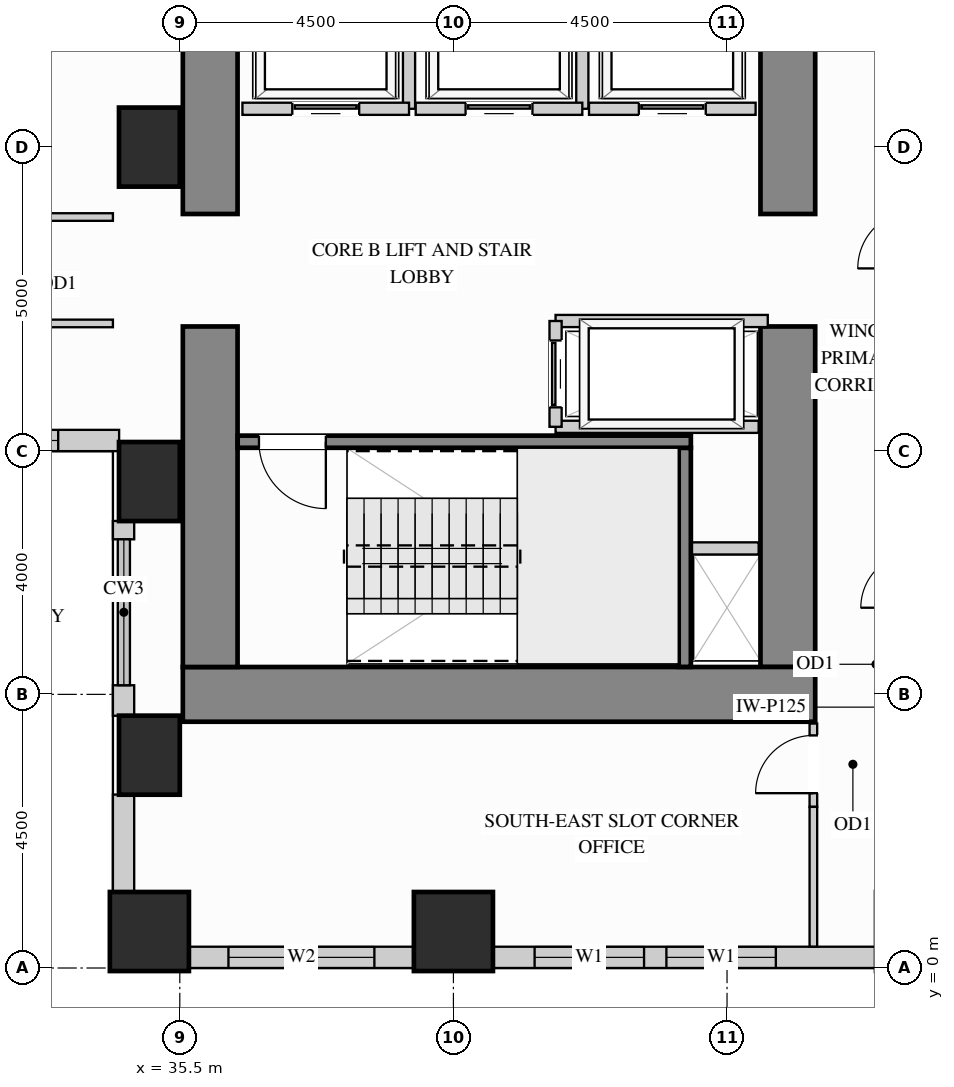
"""IFC4 building model, lengths in metres.
Left out: names, types, materials, properties, quantities, classifications, styles, units other than length and angle.
Written with IfcOpenShell. Run it as: python <this file> out.ifc"""

import sys

from ifc_helpers import new_model, si_unit, direction, frame, frame_2d, origin, origin_2d, place, context, subcontext, project, spatial, rectangle, extrude, source, transform, mapped, element, fill, save


model = new_model("IFC4")
c1 = context("Model", 3, precision=1e-05, world=origin(), true_north=direction((0.0, 1.0)))
c2 = subcontext(c1, "Body", "Model", "MODEL_VIEW")
j1 = project(units=[si_unit("LENGTHUNIT", "METRE"), si_unit("PLANEANGLEUNIT", "RADIAN")], contexts=[c1])
p1 = place(None, origin())
s1 = spatial("IfcSite", under=j1, at=p1, CompositionType="ELEMENT")
p2 = place(p1, origin())
s2 = spatial("IfcBuilding", under=s1, at=p2, CompositionType="ELEMENT")
p3 = place(p2, frame((0.0, 0.0, 58.5)))
s3 = spatial("IfcBuildingStorey", under=s2, at=p3, CompositionType="ELEMENT", Elevation=58.5)
m1 = source(origin(), c2, "Body", "SweptSolid", [
    extrude(rectangle(XDim=1.0, YDim=1.3, at=origin_2d()), origin(), (0.0, 0.0, 1.0), 3.38),
])
for number, where, z_axis, x_axis in (
    (1, (35.0, 13.5, 0.0), (0.0, 0.0, 1.0), (1.0, 0.0, 0.0)),
    (2, (35.0, 3.5, 0.0), (0.0, 0.0, 1.0), (1.0, 0.0, 0.0)),
    (3, (35.0, 8.0, 0.0), (0.0, 0.0, 1.0), (1.0, 0.0, 0.0)),
):
    element("IfcColumn", number, at=place(p3, frame(where, z_axis=z_axis, x_axis=x_axis)), inside=s3, PredefinedType="COLUMN", context=c2, shape_type="MappedRepresentation", body=[
        mapped(m1, transform((0.0, 0.0, 0.0), x_axis=(1.0, 0.0, 0.0), y_axis=(0.0, 1.0, 0.0), z_axis=(0.0, 0.0, 1.0))),
    ])
m2 = source(origin(), c2, "Body", "SweptSolid", [
    extrude(rectangle(XDim=1.3, YDim=1.3, at=origin_2d()), origin(), (0.0, 0.0, 1.0), 3.38),
])
for number, where, z_axis, x_axis in (
    (4, (35.0, 0.6, 0.0), (0.0, 0.0, 1.0), (1.0, 0.0, 0.0)),
    (5, (40.0, 0.6, 0.0), (0.0, 0.0, 1.0), (1.0, 0.0, 0.0)),
):
    element("IfcColumn", number, at=place(p3, frame(where, z_axis=z_axis, x_axis=x_axis)), inside=s3, PredefinedType="COLUMN", context=c2, shape_type="MappedRepresentation", body=[
        mapped(m2, transform((0.0, 0.0, 0.0), x_axis=(1.0, 0.0, 0.0), y_axis=(0.0, 1.0, 0.0), z_axis=(0.0, 0.0, 1.0))),
    ])
m3 = source(origin(), c2, "Body", "SweptSolid", [
    extrude(rectangle(XDim=5.6, YDim=0.9, at=frame_2d((2.8, 0.0))), origin(), (0.0, 0.0, 1.0), 3.38),
])
p4 = place(p3, frame((45.5, 4.95, 0.0), z_axis=(0.0, 0.0, 1.0), x_axis=(0.0, 1.0, 0.0)))
e6 = element("IfcWall", 6, at=p4, inside=s3, PredefinedType="SHEAR", context=c2, shape_type="MappedRepresentation", body=[
    mapped(m3, transform((0.0, 0.0, 0.0), x_axis=(1.0, 0.0, 0.0), y_axis=(0.0, 1.0, 0.0), z_axis=(0.0, 0.0, 1.0))),
])
m4 = source(origin(), c2, "Body", "SweptSolid", [
    extrude(rectangle(XDim=3.65, YDim=0.9, at=frame_2d((1.825, 0.0))), origin(), (0.0, 0.0, 1.0), 3.38),
])
p5 = place(p3, frame((45.5, 12.4, 0.0), z_axis=(0.0, 0.0, 1.0), x_axis=(0.0, 1.0, 0.0)))
e7 = element("IfcWall", 7, at=p5, inside=s3, PredefinedType="SHEAR", context=c2, shape_type="MappedRepresentation", body=[
    mapped(m4, transform((0.0, 0.0, 0.0), x_axis=(1.0, 0.0, 0.0), y_axis=(0.0, 1.0, 0.0), z_axis=(0.0, 0.0, 1.0))),
])
m5 = source(origin(), c2, "Body", "SweptSolid", [
    extrude(rectangle(XDim=10.4, YDim=0.9, at=frame_2d((5.2, 0.0))), origin(), (0.0, 0.0, 1.0), 3.38),
])
p6 = place(p3, frame((35.55, 4.5, 0.0), z_axis=(0.0, 0.0, 1.0), x_axis=(1.0, 0.0, 0.0)))
e8 = element("IfcWall", 8, at=p6, inside=s3, PredefinedType="SHEAR", context=c2, shape_type="MappedRepresentation", body=[
    mapped(m5, transform((0.0, 0.0, 0.0), x_axis=(1.0, 0.0, 0.0), y_axis=(0.0, 1.0, 0.0), z_axis=(0.0, 0.0, 1.0))),
])
p7 = place(p3, frame((36.0, 4.95, 0.0), z_axis=(0.0, 0.0, 1.0), x_axis=(0.0, 1.0, 0.0)))
e9 = element("IfcWall", 9, at=p7, inside=s3, PredefinedType="SHEAR", context=c2, shape_type="MappedRepresentation", body=[
    mapped(m3, transform((0.0, 0.0, 0.0), x_axis=(1.0, 0.0, 0.0), y_axis=(0.0, 1.0, 0.0), z_axis=(0.0, 0.0, 1.0))),
])
p8 = place(p3, frame((36.0, 12.4, 0.0), z_axis=(0.0, 0.0, 1.0), x_axis=(0.0, 1.0, 0.0)))
e10 = element("IfcWall", 10, at=p8, inside=s3, PredefinedType="SHEAR", context=c2, shape_type="MappedRepresentation", body=[
    mapped(m4, transform((0.0, 0.0, 0.0), x_axis=(1.0, 0.0, 0.0), y_axis=(0.0, 1.0, 0.0), z_axis=(0.0, 0.0, 1.0))),
])
p9 = place(p3, frame((30.998, 8.675, 0.0), z_axis=(0.0, 0.0, 1.0), x_axis=(1.0, 0.0, 0.0)))
e11 = element("IfcWall", 11, at=p9, inside=s3, PredefinedType="SOLIDWALL", context=c2, shape_type="SweptSolid", body=[
    extrude(rectangle(XDim=3.504, YDim=0.35, at=frame_2d((1.752, 0.0))), origin(), (0.0, 0.0, 1.0), 3.365),
])
p10 = place(p9, frame((1.002, 0.0, 0.78)))
e12 = element("IfcOpeningElement", 12, at=p10, cuts=e11, PredefinedType="OPENING", context=c2, shape_type="SweptSolid", body=[
    extrude(rectangle(XDim=1.5, YDim=2.0, at=frame_2d((0.75, 1.0))), frame((0.0, 0.185, 0.0), z_axis=(0.0, -1.0, 0.0), x_axis=(1.0, 0.0, 0.0)), (0.0, 0.0, 1.0), 0.37),
])
m6 = source(origin(), c2, "Body", "SweptSolid", [
    extrude(rectangle(XDim=0.302, YDim=0.35, at=frame_2d((0.151, 0.0))), origin(), (0.0, 0.0, 1.0), 2.51),
])
p11 = place(p3, frame((34.575, 7.352, 0.0), z_axis=(0.0, 0.0, 1.0), x_axis=(0.0, -1.0, 0.0)))
e13 = element("IfcWall", 13, at=p11, inside=s3, PredefinedType="SOLIDWALL", context=c2, shape_type="MappedRepresentation", body=[
    mapped(m6, transform((0.0, 0.0, 0.0), x_axis=(1.0, 0.0, 0.0), y_axis=(0.0, 1.0, 0.0), z_axis=(0.0, 0.0, 1.0))),
])
m7 = source(origin(), c2, "Body", "SweptSolid", [
    extrude(rectangle(XDim=0.502, YDim=0.35, at=frame_2d((0.251, 0.0))), origin(), (0.0, 0.0, 1.0), 2.51),
])
p12 = place(p3, frame((34.575, 4.65, 0.0), z_axis=(0.0, 0.0, 1.0), x_axis=(0.0, -1.0, 0.0)))
e14 = element("IfcWall", 14, at=p12, inside=s3, PredefinedType="SOLIDWALL", context=c2, shape_type="MappedRepresentation", body=[
    mapped(m7, transform((0.0, 0.0, 0.0), x_axis=(1.0, 0.0, 0.0), y_axis=(0.0, 1.0, 0.0), z_axis=(0.0, 0.0, 1.0))),
])
m8 = source(origin(), c2, "Body", "SweptSolid", [
    extrude(rectangle(XDim=1.604, YDim=0.35, at=frame_2d((0.802, 0.0))), origin(), (0.0, 0.0, 1.0), 2.51),
])
p13 = place(p3, frame((34.575, 2.852, 0.0), z_axis=(0.0, 0.0, 1.0), x_axis=(0.0, -1.0, 0.0)))
e15 = element("IfcWall", 15, at=p13, inside=s3, PredefinedType="SOLIDWALL", context=c2, shape_type="MappedRepresentation", body=[
    mapped(m8, transform((0.0, 0.0, 0.0), x_axis=(1.0, 0.0, 0.0), y_axis=(0.0, 1.0, 0.0), z_axis=(0.0, 0.0, 1.0))),
])
p14 = place(p3, frame((35.648, 0.175, 0.0), z_axis=(0.0, 0.0, 1.0), x_axis=(1.0, 0.0, 0.0)))
e16 = element("IfcWall", 16, at=p14, inside=s3, PredefinedType="SOLIDWALL", context=c2, shape_type="SweptSolid", body=[
    extrude(rectangle(XDim=3.704, YDim=0.35, at=frame_2d((1.852, 0.0))), origin(), (0.0, 0.0, 1.0), 2.428),
])
p15 = place(p14, frame((0.652, 0.0, 0.78)))
e17 = element("IfcOpeningElement", 17, at=p15, cuts=e16, PredefinedType="OPENING", context=c2, shape_type="SweptSolid", body=[
    extrude(rectangle(XDim=2.4, YDim=1.468, at=frame_2d((1.2, 0.734))), frame((0.0, 0.185, 0.0), z_axis=(0.0, -1.0, 0.0), x_axis=(1.0, 0.0, 0.0)), (0.0, 0.0, 1.0), 0.37),
])
p16 = place(p3, frame((40.648, 0.175, 0.0), z_axis=(0.0, 0.0, 1.0), x_axis=(1.0, 0.0, 0.0)))
e18 = element("IfcWall", 18, at=p16, inside=s3, PredefinedType="SOLIDWALL", context=c2, shape_type="SweptSolid", body=[
    extrude(rectangle(XDim=6.304, YDim=0.35, at=frame_2d((3.152, 0.0))), origin(), (0.0, 0.0, 1.0), 2.428),
])
p17 = place(p16, frame((0.687, 0.0, 0.78)))
e19 = element("IfcOpeningElement", 19, at=p17, cuts=e18, PredefinedType="OPENING", context=c2, shape_type="SweptSolid", body=[
    extrude(rectangle(XDim=1.8, YDim=1.468, at=frame_2d((0.9, 0.734))), frame((0.0, 0.185, 0.0), z_axis=(0.0, -1.0, 0.0), x_axis=(1.0, 0.0, 0.0)), (0.0, 0.0, 1.0), 0.37),
])
p18 = place(p16, frame((2.855, 0.0, 0.78)))
e20 = element("IfcOpeningElement", 20, at=p18, cuts=e18, PredefinedType="OPENING", context=c2, shape_type="SweptSolid", body=[
    extrude(rectangle(XDim=1.8, YDim=1.468, at=frame_2d((0.9, 0.734))), frame((0.0, 0.185, 0.0), z_axis=(0.0, -1.0, 0.0), x_axis=(1.0, 0.0, 0.0)), (0.0, 0.0, 1.0), 0.37),
])
p19 = place(p3, frame((45.92, 2.65, 0.0), z_axis=(0.0, 0.0, 1.0), x_axis=(0.0, 1.0, 0.0)))
e21 = element("IfcWall", 21, at=p19, inside=s3, PredefinedType="PARTITIONING", context=c2, shape_type="SweptSolid", body=[
    extrude(rectangle(XDim=1.37, YDim=0.125, at=frame_2d((0.685, 0.0))), origin(), (0.0, 0.0, 1.0), 3.365),
])
p20 = place(p19, frame((0.225, 0.0, 0.0)))
e22 = element("IfcOpeningElement", 22, at=p20, cuts=e21, PredefinedType="OPENING", context=c2, shape_type="SweptSolid", body=[
    extrude(rectangle(XDim=0.95, YDim=2.15, at=frame_2d((0.475, 1.075))), frame((0.0, 0.073, 0.0), z_axis=(0.0, -1.0, 0.0), x_axis=(1.0, 0.0, 0.0)), (0.0, 0.0, 1.0), 0.145),
])
m9 = source(origin(), c2, "Body", "SweptSolid", [
    extrude(rectangle(XDim=2.298, YDim=0.125, at=frame_2d((1.149, 0.0))), origin(), (0.0, 0.0, 1.0), 3.365),
])
p21 = place(p3, frame((45.92, 0.352, 0.0), z_axis=(0.0, 0.0, 1.0), x_axis=(0.0, 1.0, 0.0)))
e23 = element("IfcWall", 23, at=p21, inside=s3, PredefinedType="PARTITIONING", context=c2, shape_type="MappedRepresentation", body=[
    mapped(m9, transform((0.0, 0.0, 0.0), x_axis=(1.0, 0.0, 0.0), y_axis=(0.0, 1.0, 0.0), z_axis=(0.0, 0.0, 1.0))),
])
p22 = place(p3, frame((29.85, 12.35, 0.0), z_axis=(0.0, 0.0, 1.0), x_axis=(1.0, 0.0, 0.0)))
e24 = element("IfcWall", 24, at=p22, inside=s3, PredefinedType="PARTITIONING", context=c2, shape_type="SweptSolid", body=[
    extrude(rectangle(XDim=4.55, YDim=0.125, at=frame_2d((2.275, 0.0))), origin(), (0.0, 0.0, 1.0), 3.365),
])
p23 = place(p22, frame((1.8, 0.0, 0.0)))
e25 = element("IfcOpeningElement", 25, at=p23, cuts=e24, PredefinedType="OPENING", context=c2, shape_type="SweptSolid", body=[
    extrude(rectangle(XDim=0.95, YDim=2.15, at=frame_2d((0.475, 1.075))), frame((0.0, 0.073, 0.0), z_axis=(0.0, -1.0, 0.0), x_axis=(1.0, 0.0, 0.0)), (0.0, 0.0, 1.0), 0.145),
])
p24 = place(p3, frame((29.85, 10.6, 0.0), z_axis=(0.0, 0.0, 1.0), x_axis=(1.0, 0.0, 0.0)))
e26 = element("IfcWall", 26, at=p24, inside=s3, PredefinedType="PARTITIONING", context=c2, shape_type="SweptSolid", body=[
    extrude(rectangle(XDim=4.55, YDim=0.125, at=frame_2d((2.275, 0.0))), origin(), (0.0, 0.0, 1.0), 3.365),
])
p25 = place(p24, frame((1.8, 0.0, 0.0)))
e27 = element("IfcOpeningElement", 27, at=p25, cuts=e26, PredefinedType="OPENING", context=c2, shape_type="SweptSolid", body=[
    extrude(rectangle(XDim=0.95, YDim=2.15, at=frame_2d((0.475, 1.075))), frame((0.0, 0.073, 0.0), z_axis=(0.0, -1.0, 0.0), x_axis=(1.0, 0.0, 0.0)), (0.0, 0.0, 1.0), 0.145),
])
m10 = source(origin(), c2, "Body", "SweptSolid", [
    extrude(rectangle(XDim=1.17, YDim=0.2, at=frame_2d((0.585, 0.0))), origin(), (0.0, 0.0, 1.0), 3.365),
])
p26 = place(p3, frame((43.85, 6.9, 0.0), z_axis=(0.0, 0.0, 1.0), x_axis=(1.0, 0.0, 0.0)))
e28 = element("IfcWall", 28, at=p26, inside=s3, PredefinedType="PARTITIONING", context=c2, shape_type="MappedRepresentation", body=[
    mapped(m10, transform((0.0, 0.0, 0.0), x_axis=(1.0, 0.0, 0.0), y_axis=(0.0, 1.0, 0.0), z_axis=(0.0, 0.0, 1.0))),
])
m11 = source(origin(), c2, "Body", "SweptSolid", [
    extrude(rectangle(XDim=1.89, YDim=0.2, at=frame_2d((0.945, 0.0))), origin(), (0.0, 0.0, 1.0), 3.365),
])
p27 = place(p3, frame((39.27, 14.13, 0.0), z_axis=(0.0, 0.0, 1.0), x_axis=(0.0, 1.0, 0.0)))
e29 = element("IfcWall", 29, at=p27, inside=s3, PredefinedType="PARTITIONING", context=c2, shape_type="MappedRepresentation", body=[
    mapped(m11, transform((0.0, 0.0, 0.0), x_axis=(1.0, 0.0, 0.0), y_axis=(0.0, 1.0, 0.0), z_axis=(0.0, 0.0, 1.0))),
])
p28 = place(p3, frame((36.53, 14.13, 0.0), z_axis=(0.0, 0.0, 1.0), x_axis=(1.0, 0.0, 0.0)))
e30 = element("IfcWall", 30, at=p28, inside=s3, PredefinedType="PARTITIONING", context=c2, shape_type="SweptSolid", body=[
    extrude(rectangle(XDim=2.74, YDim=0.2, at=frame_2d((1.37, 0.0))), origin(), (0.0, 0.0, 1.0), 3.365),
])
p29 = place(p28, frame((0.82, 0.0, 0.0)))
e31 = element("IfcOpeningElement", 31, at=p29, cuts=e30, PredefinedType="OPENING", context=c2, shape_type="SweptSolid", body=[
    extrude(rectangle(XDim=1.1, YDim=2.2, at=frame_2d((0.55, 1.1))), frame((0.0, 0.11, 0.0), z_axis=(0.0, -1.0, 0.0), x_axis=(1.0, 0.0, 0.0)), (0.0, 0.0, 1.0), 0.22),
])
p30 = place(p3, frame((42.12, 14.13, 0.0), z_axis=(0.0, 0.0, 1.0), x_axis=(0.0, 1.0, 0.0)))
e32 = element("IfcWall", 32, at=p30, inside=s3, PredefinedType="PARTITIONING", context=c2, shape_type="MappedRepresentation", body=[
    mapped(m11, transform((0.0, 0.0, 0.0), x_axis=(1.0, 0.0, 0.0), y_axis=(0.0, 1.0, 0.0), z_axis=(0.0, 0.0, 1.0))),
])
p31 = place(p3, frame((39.38, 14.13, 0.0), z_axis=(0.0, 0.0, 1.0), x_axis=(1.0, 0.0, 0.0)))
e33 = element("IfcWall", 33, at=p31, inside=s3, PredefinedType="PARTITIONING", context=c2, shape_type="SweptSolid", body=[
    extrude(rectangle(XDim=2.74, YDim=0.2, at=frame_2d((1.37, 0.0))), origin(), (0.0, 0.0, 1.0), 3.365),
])
p32 = place(p31, frame((0.82, 0.0, 0.0)))
e34 = element("IfcOpeningElement", 34, at=p32, cuts=e33, PredefinedType="OPENING", context=c2, shape_type="SweptSolid", body=[
    extrude(rectangle(XDim=1.1, YDim=2.2, at=frame_2d((0.55, 1.1))), frame((0.0, 0.11, 0.0), z_axis=(0.0, -1.0, 0.0), x_axis=(1.0, 0.0, 0.0)), (0.0, 0.0, 1.0), 0.22),
])
p33 = place(p3, frame((42.23, 14.13, 0.0), z_axis=(0.0, 0.0, 1.0), x_axis=(1.0, 0.0, 0.0)))
e35 = element("IfcWall", 35, at=p33, inside=s3, PredefinedType="PARTITIONING", context=c2, shape_type="SweptSolid", body=[
    extrude(rectangle(XDim=2.74, YDim=0.2, at=frame_2d((1.37, 0.0))), origin(), (0.0, 0.0, 1.0), 3.365),
])
p34 = place(p33, frame((0.82, 0.0, 0.0)))
e36 = element("IfcOpeningElement", 36, at=p34, cuts=e35, PredefinedType="OPENING", context=c2, shape_type="SweptSolid", body=[
    extrude(rectangle(XDim=1.1, YDim=2.2, at=frame_2d((0.55, 1.1))), frame((0.0, 0.11, 0.0), z_axis=(0.0, -1.0, 0.0), x_axis=(1.0, 0.0, 0.0)), (0.0, 0.0, 1.0), 0.22),
])
m12 = source(origin(), c2, "Body", "SweptSolid", [
    extrude(rectangle(XDim=3.49, YDim=0.2, at=frame_2d((1.745, 0.0))), origin(), (0.0, 0.0, 1.0), 3.365),
])
p35 = place(p3, frame((41.68, 10.64, 0.0), z_axis=(0.0, 0.0, 1.0), x_axis=(1.0, 0.0, 0.0)))
e37 = element("IfcWall", 37, at=p35, inside=s3, PredefinedType="PARTITIONING", context=c2, shape_type="MappedRepresentation", body=[
    mapped(m12, transform((0.0, 0.0, 0.0), x_axis=(1.0, 0.0, 0.0), y_axis=(0.0, 1.0, 0.0), z_axis=(0.0, 0.0, 1.0))),
])
m13 = source(origin(), c2, "Body", "SweptSolid", [
    extrude(rectangle(XDim=3.34, YDim=0.2, at=frame_2d((1.67, 0.0))), origin(), (0.0, 0.0, 1.0), 3.365),
])
p36 = place(p3, frame((41.68, 8.9, 0.0), z_axis=(0.0, 0.0, 1.0), x_axis=(1.0, 0.0, 0.0)))
e38 = element("IfcWall", 38, at=p36, inside=s3, PredefinedType="PARTITIONING", context=c2, shape_type="MappedRepresentation", body=[
    mapped(m13, transform((0.0, 0.0, 0.0), x_axis=(1.0, 0.0, 0.0), y_axis=(0.0, 1.0, 0.0), z_axis=(0.0, 0.0, 1.0))),
])
p37 = place(p3, frame((41.68, 8.9, 0.0), z_axis=(0.0, 0.0, 1.0), x_axis=(0.0, 1.0, 0.0)))
e39 = element("IfcWall", 39, at=p37, inside=s3, PredefinedType="PARTITIONING", context=c2, shape_type="SweptSolid", body=[
    extrude(rectangle(XDim=1.74, YDim=0.2, at=frame_2d((0.87, 0.0))), origin(), (0.0, 0.0, 1.0), 3.365),
])
p38 = place(p37, frame((0.32, 0.0, 0.0)))
e40 = element("IfcOpeningElement", 40, at=p38, cuts=e39, PredefinedType="OPENING", context=c2, shape_type="SweptSolid", body=[
    extrude(rectangle(XDim=1.1, YDim=2.2, at=frame_2d((0.55, 1.1))), frame((0.0, 0.11, 0.0), z_axis=(0.0, -1.0, 0.0), x_axis=(1.0, 0.0, 0.0)), (0.0, 0.0, 1.0), 0.22),
])
m14 = source(origin(), c2, "Body", "SweptSolid", [
    extrude(rectangle(XDim=3.603, YDim=0.2, at=frame_2d((1.802, 0.0))), origin(), (0.0, 0.0, 1.0), 3.38),
])
p39 = place(p3, frame((43.805, 4.952, 0.0), z_axis=(0.0, 0.0, 1.0), x_axis=(0.0, 1.0, 0.0)))
e41 = element("IfcWall", 41, at=p39, inside=s3, PredefinedType="SHEAR", context=c2, shape_type="MappedRepresentation", body=[
    mapped(m14, transform((0.0, 0.0, 0.0), x_axis=(1.0, 0.0, 0.0), y_axis=(0.0, 1.0, 0.0), z_axis=(0.0, 0.0, 1.0))),
])
p40 = place(p3, frame((36.452, 8.655, 0.0), z_axis=(0.0, 0.0, 1.0), x_axis=(1.0, 0.0, 0.0)))
e42 = element("IfcWall", 42, at=p40, inside=s3, PredefinedType="SHEAR", context=c2, shape_type="SweptSolid", body=[
    extrude(rectangle(XDim=7.453, YDim=0.2, at=frame_2d((3.727, 0.0))), origin(), (0.0, 0.0, 1.0), 3.38),
])
p41 = place(p40, frame((0.35, 0.0, 0.0)))
e43 = element("IfcOpeningElement", 43, at=p41, cuts=e42, PredefinedType="OPENING", context=c2, shape_type="SweptSolid", body=[
    extrude(rectangle(XDim=1.1, YDim=2.15, at=frame_2d((0.55, 1.075))), frame((0.0, 0.11, 0.0), z_axis=(0.0, -1.0, 0.0), x_axis=(1.0, 0.0, 0.0)), (0.0, 0.0, 1.0), 0.22),
])
m15 = source(origin(), c2, "Body", "SweptSolid", [
    extrude(rectangle(XDim=1.1, YDim=2.2, at=frame_2d((0.55, 1.1))), frame((0.0, 0.025, 0.0), z_axis=(0.0, -1.0, 0.0), x_axis=(1.0, 0.0, 0.0)), (0.0, 0.0, 1.0), 0.05),
])
p42 = place(p29, origin())
e44 = element("IfcDoor", 44, at=p42, inside=s3, OperationType="SLIDING_TO_LEFT", PredefinedType="DOOR", context=c2, shape_type="MappedRepresentation", body=[
    mapped(m15, transform((0.0, 0.0, 0.0), x_axis=(1.0, 0.0, 0.0), y_axis=(0.0, 1.0, 0.0), z_axis=(0.0, 0.0, 1.0))),
])
fill(e31, e44)
p43 = place(p32, origin())
e45 = element("IfcDoor", 45, at=p43, inside=s3, OperationType="SLIDING_TO_LEFT", PredefinedType="DOOR", context=c2, shape_type="MappedRepresentation", body=[
    mapped(m15, transform((0.0, 0.0, 0.0), x_axis=(1.0, 0.0, 0.0), y_axis=(0.0, 1.0, 0.0), z_axis=(0.0, 0.0, 1.0))),
])
fill(e34, e45)
p44 = place(p34, origin())
e46 = element("IfcDoor", 46, at=p44, inside=s3, OperationType="SLIDING_TO_LEFT", PredefinedType="DOOR", context=c2, shape_type="MappedRepresentation", body=[
    mapped(m15, transform((0.0, 0.0, 0.0), x_axis=(1.0, 0.0, 0.0), y_axis=(0.0, 1.0, 0.0), z_axis=(0.0, 0.0, 1.0))),
])
fill(e36, e46)
p45 = place(p38, origin())
e47 = element("IfcDoor", 47, at=p45, inside=s3, OperationType="SLIDING_TO_LEFT", PredefinedType="DOOR", context=c2, shape_type="MappedRepresentation", body=[
    mapped(m15, transform((0.0, 0.0, 0.0), x_axis=(1.0, 0.0, 0.0), y_axis=(0.0, 1.0, 0.0), z_axis=(0.0, 0.0, 1.0))),
])
fill(e40, e47)
m16 = source(origin(), c2, "Body", "SweptSolid", [
    extrude(rectangle(XDim=0.95, YDim=2.15, at=frame_2d((0.475, 1.075))), frame((0.0, 0.025, 0.0), z_axis=(0.0, -1.0, 0.0), x_axis=(1.0, 0.0, 0.0)), (0.0, 0.0, 1.0), 0.05),
])
p46 = place(p20, origin())
e48 = element("IfcDoor", 48, at=p46, inside=s3, OperationType="SINGLE_SWING_LEFT", PredefinedType="DOOR", context=c2, shape_type="MappedRepresentation", body=[
    mapped(m16, transform((0.0, 0.0, 0.0), x_axis=(1.0, 0.0, 0.0), y_axis=(0.0, 1.0, 0.0), z_axis=(0.0, 0.0, 1.0))),
])
fill(e22, e48)
m17 = source(origin(), c2, "Body", "SweptSolid", [
    extrude(rectangle(XDim=1.1, YDim=2.15, at=frame_2d((0.55, 1.075))), frame((0.0, 0.025, 0.0), z_axis=(0.0, -1.0, 0.0), x_axis=(1.0, 0.0, 0.0)), (0.0, 0.0, 1.0), 0.05),
])
p47 = place(p41, origin())
e49 = element("IfcDoor", 49, at=p47, inside=s3, OperationType="SINGLE_SWING_RIGHT", PredefinedType="DOOR", context=c2, shape_type="MappedRepresentation", body=[
    mapped(m17, transform((0.0, 0.0, 0.0), x_axis=(1.0, 0.0, 0.0), y_axis=(0.0, 1.0, 0.0), z_axis=(0.0, 0.0, 1.0))),
])
fill(e43, e49)
m18 = source(origin(), c2, "Body", "SweptSolid", [
    extrude(rectangle(XDim=1.8, YDim=1.468, at=frame_2d((0.9, 0.734))), frame((0.0, 0.03, 0.0), z_axis=(0.0, -1.0, 0.0), x_axis=(1.0, 0.0, 0.0)), (0.0, 0.0, 1.0), 0.06),
])
p48 = place(p17, origin())
e50 = element("IfcWindow", 50, at=p48, inside=s3, PartitioningType="SINGLE_PANEL", PredefinedType="WINDOW", context=c2, shape_type="MappedRepresentation", body=[
    mapped(m18, transform((0.0, 0.0, 0.0), x_axis=(1.0, 0.0, 0.0), y_axis=(0.0, 1.0, 0.0), z_axis=(0.0, 0.0, 1.0))),
])
fill(e19, e50)
p49 = place(p18, origin())
e51 = element("IfcWindow", 51, at=p49, inside=s3, PartitioningType="SINGLE_PANEL", PredefinedType="WINDOW", context=c2, shape_type="MappedRepresentation", body=[
    mapped(m18, transform((0.0, 0.0, 0.0), x_axis=(1.0, 0.0, 0.0), y_axis=(0.0, 1.0, 0.0), z_axis=(0.0, 0.0, 1.0))),
])
fill(e20, e51)
m19 = source(origin(), c2, "Body", "SweptSolid", [
    extrude(rectangle(XDim=2.4, YDim=1.468, at=frame_2d((1.2, 0.734))), frame((0.0, 0.03, 0.0), z_axis=(0.0, -1.0, 0.0), x_axis=(1.0, 0.0, 0.0)), (0.0, 0.0, 1.0), 0.06),
])
p50 = place(p15, origin())
e52 = element("IfcWindow", 52, at=p50, inside=s3, PartitioningType="SINGLE_PANEL", PredefinedType="WINDOW", context=c2, shape_type="MappedRepresentation", body=[
    mapped(m19, transform((0.0, 0.0, 0.0), x_axis=(1.0, 0.0, 0.0), y_axis=(0.0, 1.0, 0.0), z_axis=(0.0, 0.0, 1.0))),
])
fill(e17, e52)
m20 = source(origin(), c2, "Body", "SweptSolid", [
    extrude(rectangle(XDim=1.5, YDim=2.0, at=frame_2d((0.75, 1.0))), frame((0.0, 0.03, 0.0), z_axis=(0.0, -1.0, 0.0), x_axis=(1.0, 0.0, 0.0)), (0.0, 0.0, 1.0), 0.06),
])
p51 = place(p10, origin())
e53 = element("IfcWindow", 53, at=p51, inside=s3, PartitioningType="SINGLE_PANEL", PredefinedType="WINDOW", context=c2, shape_type="MappedRepresentation", body=[
    mapped(m20, transform((0.0, 0.0, 0.0), x_axis=(1.0, 0.0, 0.0), y_axis=(0.0, 1.0, 0.0), z_axis=(0.0, 0.0, 1.0))),
])
fill(e12, e53)
save(model, sys.argv[1])
